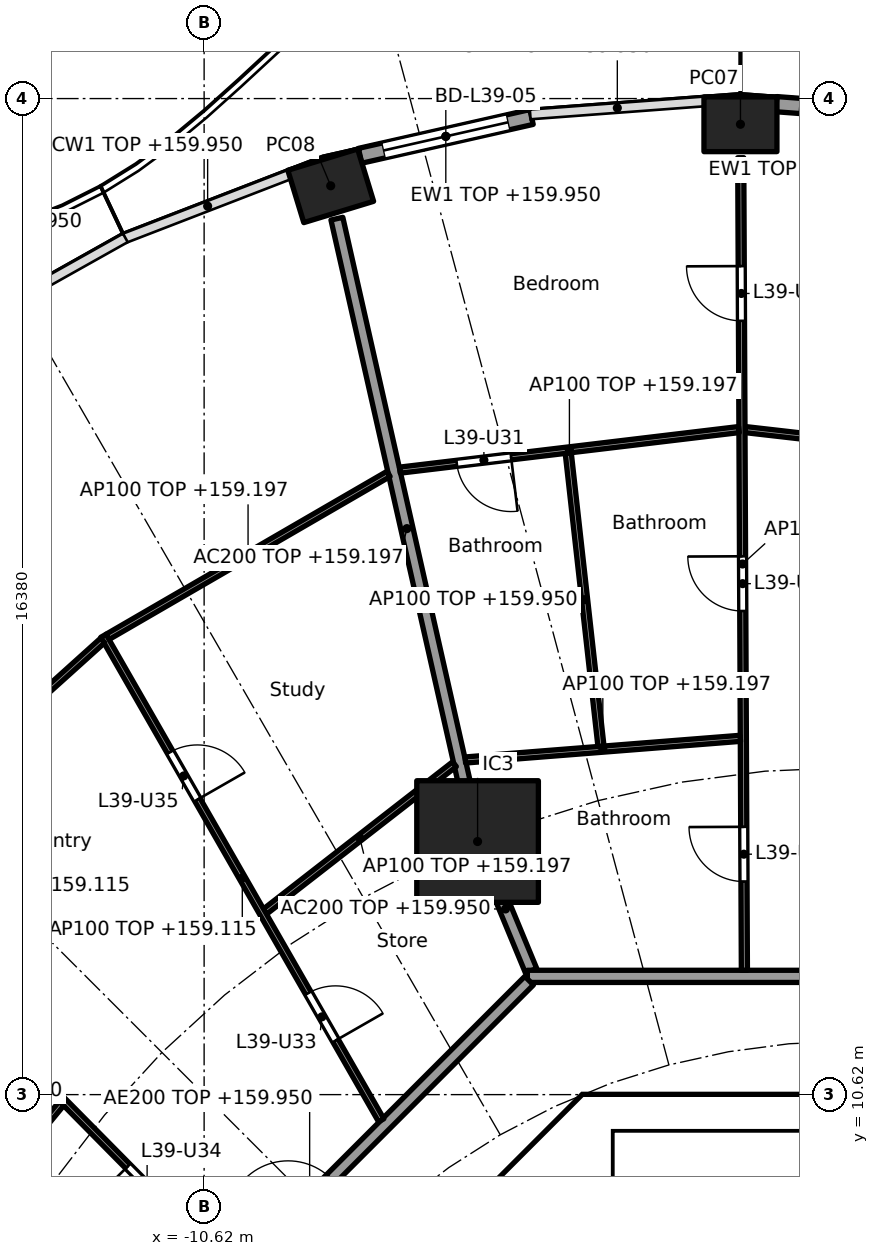
"""IFC4 building model, lengths in metres.
Left out: names, types, materials, properties, quantities, classifications, styles, units other than length and angle.
Written with IfcOpenShell. Run it as: python <this file> out.ifc"""

import sys

from ifc_helpers import new_model, si_unit, direction, frame, frame_2d, origin, origin_2d, place, context, subcontext, project, spatial, polyline, rectangle, hollow_rectangle, outline, extrude, element, fill, save


model = new_model("IFC4")
c1 = context("Model", 3, precision=1e-05, world=origin(), true_north=direction((0.0, 1.0)))
c2 = subcontext(c1, "Body", "Model", "MODEL_VIEW")
j1 = project(units=[si_unit("LENGTHUNIT", "METRE"), si_unit("PLANEANGLEUNIT", "RADIAN")], contexts=[c1])
p1 = place(None, origin())
s1 = spatial("IfcSite", under=j1, at=p1, CompositionType="ELEMENT")
p2 = place(p1, origin())
s2 = spatial("IfcBuilding", under=s1, at=p2, CompositionType="ELEMENT")
p3 = place(p2, frame((0.0, 0.0, 156.6)))
s3 = spatial("IfcBuildingStorey", under=s2, at=p3, CompositionType="ELEMENT", Elevation=156.6)
for number, where, z_axis, x_axis in (
    (1, (-1.8, 26.577, 0.0), (0.0, 0.0, 1.0), (-1.0, 0.0, 0.0)),
    (2, (-8.538, 25.565, 0.0), (0.0, 0.0, 1.0), (-0.957, -0.292, 0.0)),
):
    element("IfcColumn", number, at=place(p3, frame(where, z_axis=z_axis, x_axis=x_axis)), inside=s3, PredefinedType="COLUMN", context=c2, shape_type="SweptSolid", body=[
        extrude(hollow_rectangle(XDim=1.2, YDim=0.9, WallThickness=0.04, at=origin_2d()), origin(), (0.0, 0.0, 1.0), 3.7),
    ])
p4 = place(p3, frame((-6.123, 14.782, 0.0), z_axis=(0.0, 0.0, 1.0), x_axis=(1.0, 0.0, 0.0)))
e3 = element("IfcColumn", 3, at=p4, inside=s3, PredefinedType="COLUMN", context=c2, shape_type="SweptSolid", body=[
    extrude(rectangle(XDim=2.0, YDim=2.0, at=origin_2d()), origin(), (0.0, 0.0, 1.0), 3.7),
])
p5 = place(p3, frame((-1.211, 26.908, 0.0), z_axis=(0.0, 0.0, 1.0), x_axis=(0.997232166829, -0.074350557769, 0.0)))
e4 = element("IfcWall", 4, at=p5, inside=s3, PredefinedType="SOLIDWALL", context=c2, shape_type="SweptSolid", body=[
    extrude(rectangle(XDim=2.873, YDim=0.25, at=frame_2d((1.437, 0.0))), origin(), (0.0, 0.0, 1.0), 3.35),
])
p6 = place(p5, frame((0.386, 0.0, 0.0)))
e5 = element("IfcOpeningElement", 5, at=p6, cuts=e4, PredefinedType="OPENING", context=c2, shape_type="SweptSolid", body=[
    extrude(rectangle(XDim=2.1, YDim=2.4, at=frame_2d((1.05, 1.2))), frame((0.0, 0.135, 0.0), z_axis=(0.0, -1.0, 0.0), x_axis=(1.0, 0.0, 0.0)), (0.0, 0.0, 1.0), 0.27),
])
p7 = place(p3, frame((-8.055, 26.059, 0.0), z_axis=(0.0, 0.0, 1.0), x_axis=(0.975339035722, 0.220711951186, 0.0)))
e6 = element("IfcWall", 6, at=p7, inside=s3, PredefinedType="SOLIDWALL", context=c2, shape_type="SweptSolid", body=[
    extrude(rectangle(XDim=2.89, YDim=0.25, at=frame_2d((1.445, 0.0))), origin(), (0.0, 0.0, 1.0), 3.35),
])
p8 = place(p7, frame((0.395, 0.0, 0.0)))
e7 = element("IfcOpeningElement", 7, at=p8, cuts=e6, PredefinedType="OPENING", context=c2, shape_type="SweptSolid", body=[
    extrude(rectangle(XDim=2.1, YDim=2.4, at=frame_2d((1.05, 1.2))), frame((0.0, 0.135, 0.0), z_axis=(0.0, -1.0, 0.0), x_axis=(1.0, 0.0, 0.0)), (0.0, 0.0, 1.0), 0.27),
])
p9 = place(p3, frame((-4.613, 9.988, 0.0), z_axis=(0.0, 0.0, 1.0), x_axis=(-0.707106781187, -0.707106781187, 0.0)))
e8 = element("IfcWall", 8, at=p9, inside=s3, PredefinedType="SHEAR", context=c2, shape_type="SweptSolid", body=[
    extrude(rectangle(XDim=7.602, YDim=0.6, at=frame_2d((3.801, 0.0))), origin(), (0.0, 0.0, 1.0), 3.35),
])
p10 = place(p9, frame((0.351, 0.0, 0.0)))
e9 = element("IfcOpeningElement", 9, at=p10, cuts=e8, PredefinedType="OPENING", context=c2, shape_type="SweptSolid", body=[
    extrude(rectangle(XDim=1.1, YDim=2.1, at=frame_2d((0.55, 1.05))), frame((0.0, 0.31, 0.0), z_axis=(0.0, -1.0, 0.0), x_axis=(1.0, 0.0, 0.0)), (0.0, 0.0, 1.0), 0.62),
])
p11 = place(p3, origin())
e10 = element("IfcWall", 10, at=p11, inside=s3, PredefinedType="SHEAR", context=c2, shape_type="SweptSolid", body=[
    extrude(outline(polyline([(-4.152, 10.025), (-4.401, 9.776), (-4.825, 10.2), (-4.401, 10.625), (4.401, 10.625), (4.825, 10.2), (4.401, 9.776), (4.152, 10.025), (-4.152, 10.025)])), origin(), (0.0, 0.0, 1.0), 3.35),
])
p12 = place(p3, origin())
e11 = element("IfcWall", 11, at=p12, inside=s3, PredefinedType="SOLIDWALL", context=c2, shape_type="SweptSolid", body=[
    extrude(outline(polyline([(-3.9, 7.025), (-4.1, 7.025), (-4.1, 10.025), (-3.9, 10.025), (-3.9, 7.025)])), origin(), (0.0, 0.0, 1.0), 3.35),
])
p13 = place(p3, frame((-5.243, 12.657, 0.0), z_axis=(0.0, 0.0, 1.0), x_axis=(-0.38273085373, 0.923859888513, 0.0)))
e12 = element("IfcWall", 12, at=p13, inside=s3, PredefinedType="PARTITIONING", context=c2, shape_type="SweptSolid", body=[
    extrude(rectangle(XDim=2.199, YDim=0.2, at=frame_2d((1.1, 0.0))), origin(), (0.0, 0.0, 1.0), 3.35),
])
p14 = place(p3, frame((-6.134, 14.831, 0.0), z_axis=(0.0, 0.0, 1.0), x_axis=(-0.220337590808, 0.975423675167, 0.0)))
e13 = element("IfcWall", 13, at=p14, inside=s3, PredefinedType="PARTITIONING", context=c2, shape_type="SweptSolid", body=[
    extrude(rectangle(XDim=10.451, YDim=0.2, at=frame_2d((5.226, 0.0))), origin(), (0.0, 0.0, 1.0), 2.597),
])
p15 = place(p3, frame((5.104, 12.565, 0.0), z_axis=(0.0, 0.0, 1.0), x_axis=(-1.0, 0.0, 0.0)))
e14 = element("IfcWall", 14, at=p15, inside=s3, PredefinedType="PARTITIONING", context=c2, shape_type="SweptSolid", body=[
    extrude(rectangle(XDim=10.409, YDim=0.2, at=frame_2d((5.205, 0.0))), origin(), (0.0, 0.0, 1.0), 3.35),
])
p16 = place(p15, frame((4.604, 0.0, 0.0)))
e15 = element("IfcOpeningElement", 15, at=p16, cuts=e14, PredefinedType="OPENING", context=c2, shape_type="SweptSolid", body=[
    extrude(rectangle(XDim=1.0, YDim=2.1, at=frame_2d((0.5, 1.05))), frame((0.0, 0.11, 0.0), z_axis=(0.0, -1.0, 0.0), x_axis=(1.0, 0.0, 0.0)), (0.0, 0.0, 1.0), 0.22),
])
p17 = place(p3, frame((-5.275, 12.494, 0.0), z_axis=(0.0, 0.0, 1.0), x_axis=(-0.707106781187, -0.707106781187, 0.0)))
e16 = element("IfcWall", 16, at=p17, inside=s3, PredefinedType="PARTITIONING", context=c2, shape_type="SweptSolid", body=[
    extrude(rectangle(XDim=10.209, YDim=0.2, at=frame_2d((5.104, 0.0))), origin(), (0.0, 0.0, 1.0), 3.35),
])
p18 = place(p17, frame((4.604, 0.0, 0.0)))
e17 = element("IfcOpeningElement", 17, at=p18, cuts=e16, PredefinedType="OPENING", context=c2, shape_type="SweptSolid", body=[
    extrude(rectangle(XDim=1.0, YDim=2.1, at=frame_2d((0.5, 1.05))), frame((0.0, 0.11, 0.0), z_axis=(0.0, -1.0, 0.0), x_axis=(1.0, 0.0, 0.0)), (0.0, 0.0, 1.0), 0.22),
])
p19 = place(p3, frame((3.751, 20.93, 0.0), z_axis=(0.0, 0.0, 1.0), x_axis=(-0.993522105273, 0.113639017658, 0.0)))
e18 = element("IfcWall", 18, at=p19, inside=s3, PredefinedType="PARTITIONING", context=c2, shape_type="SweptSolid", body=[
    extrude(rectangle(XDim=5.513, YDim=0.1, at=frame_2d((2.756, 0.0))), origin(), (0.0, 0.0, 1.0), 2.597),
])
p20 = place(p19, frame((2.306, 0.0, 0.0)))
e19 = element("IfcOpeningElement", 19, at=p20, cuts=e18, PredefinedType="OPENING", context=c2, shape_type="SweptSolid", body=[
    extrude(rectangle(XDim=0.9, YDim=2.1, at=frame_2d((0.45, 1.05))), frame((0.0, 0.06, 0.0), z_axis=(0.0, -1.0, 0.0), x_axis=(1.0, 0.0, 0.0)), (0.0, 0.0, 1.0), 0.12),
])
p21 = place(p3, frame((-1.735, 12.665, 0.0), z_axis=(0.0, 0.0, 1.0), x_axis=(-0.004494500855, 0.99998989968, 0.0)))
e20 = element("IfcWall", 20, at=p21, inside=s3, PredefinedType="PARTITIONING", context=c2, shape_type="SweptSolid", body=[
    extrude(rectangle(XDim=13.363, YDim=0.1, at=frame_2d((6.681, 0.0))), origin(), (0.0, 0.0, 1.0), 2.515),
])
p22 = place(p21, frame((1.459, 0.0, 0.0)))
e21 = element("IfcOpeningElement", 21, at=p22, cuts=e20, PredefinedType="OPENING", context=c2, shape_type="SweptSolid", body=[
    extrude(rectangle(XDim=0.9, YDim=2.1, at=frame_2d((0.45, 1.05))), frame((0.0, 0.06, 0.0), z_axis=(0.0, -1.0, 0.0), x_axis=(1.0, 0.0, 0.0)), (0.0, 0.0, 1.0), 0.12),
])
p23 = place(p21, frame((5.908, 0.0, 0.0)))
e22 = element("IfcOpeningElement", 22, at=p23, cuts=e20, PredefinedType="OPENING", context=c2, shape_type="SweptSolid", body=[
    extrude(rectangle(XDim=0.9, YDim=2.1, at=frame_2d((0.45, 1.05))), frame((0.0, 0.06, 0.0), z_axis=(0.0, -1.0, 0.0), x_axis=(1.0, 0.0, 0.0)), (0.0, 0.0, 1.0), 0.12),
])
p24 = place(p21, frame((10.68, 0.0, 0.0)))
e23 = element("IfcOpeningElement", 23, at=p24, cuts=e20, PredefinedType="OPENING", context=c2, shape_type="SweptSolid", body=[
    extrude(rectangle(XDim=0.9, YDim=2.1, at=frame_2d((0.45, 1.05))), frame((0.0, 0.06, 0.0), z_axis=(0.0, -1.0, 0.0), x_axis=(1.0, 0.0, 0.0)), (0.0, 0.0, 1.0), 0.12),
])
p25 = place(p3, frame((-1.802, 16.479, 0.0), z_axis=(0.0, 0.0, 1.0), x_axis=(-0.996907698294, -0.078581429625, 0.0)))
e24 = element("IfcWall", 24, at=p25, inside=s3, PredefinedType="PARTITIONING", context=c2, shape_type="SweptSolid", body=[
    extrude(rectangle(XDim=4.536, YDim=0.1, at=frame_2d((2.268, 0.0))), origin(), (0.0, 0.0, 1.0), 2.597),
])
p26 = place(p3, frame((-1.825, 21.557, 0.0), z_axis=(0.0, 0.0, 1.0), x_axis=(-0.992915053711, -0.11882632753, 0.0)))
e25 = element("IfcWall", 25, at=p26, inside=s3, PredefinedType="PARTITIONING", context=c2, shape_type="SweptSolid", body=[
    extrude(rectangle(XDim=5.615, YDim=0.1, at=frame_2d((2.808, 0.0))), origin(), (0.0, 0.0, 1.0), 2.597),
])
p27 = place(p26, frame((3.774, 0.0, 0.0)))
e26 = element("IfcOpeningElement", 26, at=p27, cuts=e25, PredefinedType="OPENING", context=c2, shape_type="SweptSolid", body=[
    extrude(rectangle(XDim=0.9, YDim=2.1, at=frame_2d((0.45, 1.05))), frame((0.0, 0.06, 0.0), z_axis=(0.0, -1.0, 0.0), x_axis=(1.0, 0.0, 0.0)), (0.0, 0.0, 1.0), 0.12),
])
p28 = place(p3, frame((-4.094, 16.349, 0.0), z_axis=(0.0, 0.0, 1.0), x_axis=(-0.110961740678, 0.993824678757, 0.0)))
e27 = element("IfcWall", 27, at=p28, inside=s3, PredefinedType="PARTITIONING", context=c2, shape_type="SweptSolid", body=[
    extrude(rectangle(XDim=4.852, YDim=0.1, at=frame_2d((2.426, 0.0))), origin(), (0.0, 0.0, 1.0), 3.35),
])
p29 = place(p3, frame((-6.503, 16.054, 0.0), z_axis=(0.0, 0.0, 1.0), x_axis=(-0.789428807693, -0.613842127574, 0.0)))
e28 = element("IfcWall", 28, at=p29, inside=s3, PredefinedType="PARTITIONING", context=c2, shape_type="SweptSolid", body=[
    extrude(rectangle(XDim=3.948, YDim=0.1, at=frame_2d((1.974, 0.0))), origin(), (0.0, 0.0, 1.0), 2.597),
])
p30 = place(p3, frame((-7.586, 20.827, 0.0), z_axis=(0.0, 0.0, 1.0), x_axis=(-0.865093450578, -0.501610727325, 0.0)))
e29 = element("IfcWall", 29, at=p30, inside=s3, PredefinedType="PARTITIONING", context=c2, shape_type="SweptSolid", body=[
    extrude(rectangle(XDim=5.343, YDim=0.1, at=frame_2d((2.671, 0.0))), origin(), (0.0, 0.0, 1.0), 2.597),
])
p31 = place(p3, frame((-7.708, 10.198, 0.0), z_axis=(0.0, 0.0, 1.0), x_axis=(-0.497449462689, 0.867492957937, 0.0)))
e30 = element("IfcWall", 30, at=p31, inside=s3, PredefinedType="PARTITIONING", context=c2, shape_type="SweptSolid", body=[
    extrude(rectangle(XDim=9.185, YDim=0.1, at=frame_2d((4.592, 0.0))), origin(), (0.0, 0.0, 1.0), 2.515),
])
p32 = place(p31, frame((1.511, 0.0, 0.0)))
e31 = element("IfcOpeningElement", 31, at=p32, cuts=e30, PredefinedType="OPENING", context=c2, shape_type="SweptSolid", body=[
    extrude(rectangle(XDim=0.9, YDim=2.1, at=frame_2d((0.45, 1.05))), frame((0.0, 0.06, 0.0), z_axis=(0.0, -1.0, 0.0), x_axis=(1.0, 0.0, 0.0)), (0.0, 0.0, 1.0), 0.12),
])
p33 = place(p31, frame((6.078, 0.0, 0.0)))
e32 = element("IfcOpeningElement", 32, at=p33, cuts=e30, PredefinedType="OPENING", context=c2, shape_type="SweptSolid", body=[
    extrude(rectangle(XDim=0.9, YDim=2.1, at=frame_2d((0.45, 1.05))), frame((0.0, 0.06, 0.0), z_axis=(0.0, -1.0, 0.0), x_axis=(1.0, 0.0, 0.0)), (0.0, 0.0, 1.0), 0.12),
])
p34 = place(p3, frame((-12.289, 18.089, 0.0), z_axis=(0.0, 0.0, 1.0), x_axis=(-0.743146066164, -0.669129228435, 0.0)))
e33 = element("IfcWall", 33, at=p34, inside=s3, PredefinedType="PARTITIONING", context=c2, shape_type="SweptSolid", body=[
    extrude(rectangle(XDim=5.739, YDim=0.1, at=frame_2d((2.87, 0.0))), origin(), (0.0, 0.0, 1.0), 2.597),
])
p35 = place(p34, frame((2.42, 0.0, 0.0)))
e34 = element("IfcOpeningElement", 34, at=p35, cuts=e33, PredefinedType="OPENING", context=c2, shape_type="SweptSolid", body=[
    extrude(rectangle(XDim=0.9, YDim=2.1, at=frame_2d((0.45, 1.05))), frame((0.0, 0.06, 0.0), z_axis=(0.0, -1.0, 0.0), x_axis=(1.0, 0.0, 0.0)), (0.0, 0.0, 1.0), 0.12),
])
p36 = place(p3, frame((-10.182, 7.729, 0.0), z_axis=(0.0, 0.0, 1.0), x_axis=(-0.702930219229, 0.7112588185, 0.0)))
e35 = element("IfcWall", 35, at=p36, inside=s3, PredefinedType="PARTITIONING", context=c2, shape_type="SweptSolid", body=[
    extrude(rectangle(XDim=13.719, YDim=0.1, at=frame_2d((6.859, 0.0))), origin(), (0.0, 0.0, 1.0), 2.515),
])
p37 = place(p36, frame((1.507, 0.0, 0.0)))
e36 = element("IfcOpeningElement", 36, at=p37, cuts=e35, PredefinedType="OPENING", context=c2, shape_type="SweptSolid", body=[
    extrude(rectangle(XDim=0.9, YDim=2.1, at=frame_2d((0.45, 1.05))), frame((0.0, 0.06, 0.0), z_axis=(0.0, -1.0, 0.0), x_axis=(1.0, 0.0, 0.0)), (0.0, 0.0, 1.0), 0.12),
])
p38 = place(p36, frame((6.067, 0.0, 0.0)))
e37 = element("IfcOpeningElement", 37, at=p38, cuts=e35, PredefinedType="OPENING", context=c2, shape_type="SweptSolid", body=[
    extrude(rectangle(XDim=0.9, YDim=2.1, at=frame_2d((0.45, 1.05))), frame((0.0, 0.06, 0.0), z_axis=(0.0, -1.0, 0.0), x_axis=(1.0, 0.0, 0.0)), (0.0, 0.0, 1.0), 0.12),
])
p39 = place(p36, frame((10.969, 0.0, 0.0)))
e38 = element("IfcOpeningElement", 38, at=p39, cuts=e35, PredefinedType="OPENING", context=c2, shape_type="SweptSolid", body=[
    extrude(rectangle(XDim=0.9, YDim=2.1, at=frame_2d((0.45, 1.05))), frame((0.0, 0.06, 0.0), z_axis=(0.0, -1.0, 0.0), x_axis=(1.0, 0.0, 0.0)), (0.0, 0.0, 1.0), 0.12),
])
p40 = place(p3, frame((-12.965, 10.475, 0.0), z_axis=(0.0, 0.0, 1.0), x_axis=(-0.634932102074, -0.772567942485, 0.0)))
e39 = element("IfcWall", 39, at=p40, inside=s3, PredefinedType="PARTITIONING", context=c2, shape_type="SweptSolid", body=[
    extrude(rectangle(XDim=4.782, YDim=0.1, at=frame_2d((2.391, 0.0))), origin(), (0.0, 0.0, 1.0), 2.597),
])
p41 = place(p8, origin())
e40 = element("IfcDoor", 40, at=p41, inside=s3, OperationType="SLIDING_TO_LEFT", PredefinedType="DOOR", context=c2, shape_type="SweptSolid", body=[
    extrude(rectangle(XDim=2.1, YDim=2.4, at=frame_2d((1.05, 1.2))), frame((0.0, 0.025, 0.0), z_axis=(0.0, -1.0, 0.0), x_axis=(1.0, 0.0, 0.0)), (0.0, 0.0, 1.0), 0.05),
])
fill(e7, e40)
p42 = place(p10, origin())
e41 = element("IfcDoor", 41, at=p42, inside=s3, OperationType="SINGLE_SWING_LEFT", PredefinedType="DOOR", context=c2, shape_type="SweptSolid", body=[
    extrude(rectangle(XDim=1.1, YDim=2.1, at=frame_2d((0.55, 1.05))), frame((0.0, 0.025, 0.0), z_axis=(0.0, -1.0, 0.0), x_axis=(1.0, 0.0, 0.0)), (0.0, 0.0, 1.0), 0.05),
])
fill(e9, e41)
p43 = place(p22, origin())
e42 = element("IfcDoor", 42, at=p43, inside=s3, OperationType="SINGLE_SWING_RIGHT", PredefinedType="DOOR", context=c2, shape_type="SweptSolid", body=[
    extrude(rectangle(XDim=0.9, YDim=2.1, at=frame_2d((0.45, 1.05))), frame((0.0, 0.025, 0.0), z_axis=(0.0, -1.0, 0.0), x_axis=(1.0, 0.0, 0.0)), (0.0, 0.0, 1.0), 0.05),
])
fill(e21, e42)
p44 = place(p23, origin())
e43 = element("IfcDoor", 43, at=p44, inside=s3, OperationType="SINGLE_SWING_RIGHT", PredefinedType="DOOR", context=c2, shape_type="SweptSolid", body=[
    extrude(rectangle(XDim=0.9, YDim=2.1, at=frame_2d((0.45, 1.05))), frame((0.0, 0.025, 0.0), z_axis=(0.0, -1.0, 0.0), x_axis=(1.0, 0.0, 0.0)), (0.0, 0.0, 1.0), 0.05),
])
fill(e22, e43)
p45 = place(p24, origin())
e44 = element("IfcDoor", 44, at=p45, inside=s3, OperationType="SINGLE_SWING_RIGHT", PredefinedType="DOOR", context=c2, shape_type="SweptSolid", body=[
    extrude(rectangle(XDim=0.9, YDim=2.1, at=frame_2d((0.45, 1.05))), frame((0.0, 0.025, 0.0), z_axis=(0.0, -1.0, 0.0), x_axis=(1.0, 0.0, 0.0)), (0.0, 0.0, 1.0), 0.05),
])
fill(e23, e44)
p46 = place(p27, origin())
e45 = element("IfcDoor", 45, at=p46, inside=s3, OperationType="SINGLE_SWING_LEFT", PredefinedType="DOOR", context=c2, shape_type="SweptSolid", body=[
    extrude(rectangle(XDim=0.9, YDim=2.1, at=frame_2d((0.45, 1.05))), frame((0.0, 0.025, 0.0), z_axis=(0.0, -1.0, 0.0), x_axis=(1.0, 0.0, 0.0)), (0.0, 0.0, 1.0), 0.05),
])
fill(e26, e45)
p47 = place(p32, frame((0.9, 0.0, 0.0), x_axis=(-1.0, 0.0, 0.0)))
e46 = element("IfcDoor", 46, at=p47, inside=s3, OperationType="SINGLE_SWING_RIGHT", PredefinedType="DOOR", context=c2, shape_type="SweptSolid", body=[
    extrude(rectangle(XDim=0.9, YDim=2.1, at=frame_2d((0.45, 1.05))), frame((0.0, 0.025, 0.0), z_axis=(0.0, -1.0, 0.0), x_axis=(1.0, 0.0, 0.0)), (0.0, 0.0, 1.0), 0.05),
])
fill(e31, e46)
p48 = place(p37, origin())
e47 = element("IfcDoor", 47, at=p48, inside=s3, OperationType="SINGLE_SWING_RIGHT", PredefinedType="DOOR", context=c2, shape_type="SweptSolid", body=[
    extrude(rectangle(XDim=0.9, YDim=2.1, at=frame_2d((0.45, 1.05))), frame((0.0, 0.025, 0.0), z_axis=(0.0, -1.0, 0.0), x_axis=(1.0, 0.0, 0.0)), (0.0, 0.0, 1.0), 0.05),
])
fill(e36, e47)
p49 = place(p33, frame((0.9, 0.0, 0.0), x_axis=(-1.0, 0.0, 0.0)))
e48 = element("IfcDoor", 48, at=p49, inside=s3, OperationType="SINGLE_SWING_RIGHT", PredefinedType="DOOR", context=c2, shape_type="SweptSolid", body=[
    extrude(rectangle(XDim=0.9, YDim=2.1, at=frame_2d((0.45, 1.05))), frame((0.0, 0.025, 0.0), z_axis=(0.0, -1.0, 0.0), x_axis=(1.0, 0.0, 0.0)), (0.0, 0.0, 1.0), 0.05),
])
fill(e32, e48)
save(model, sys.argv[1])
